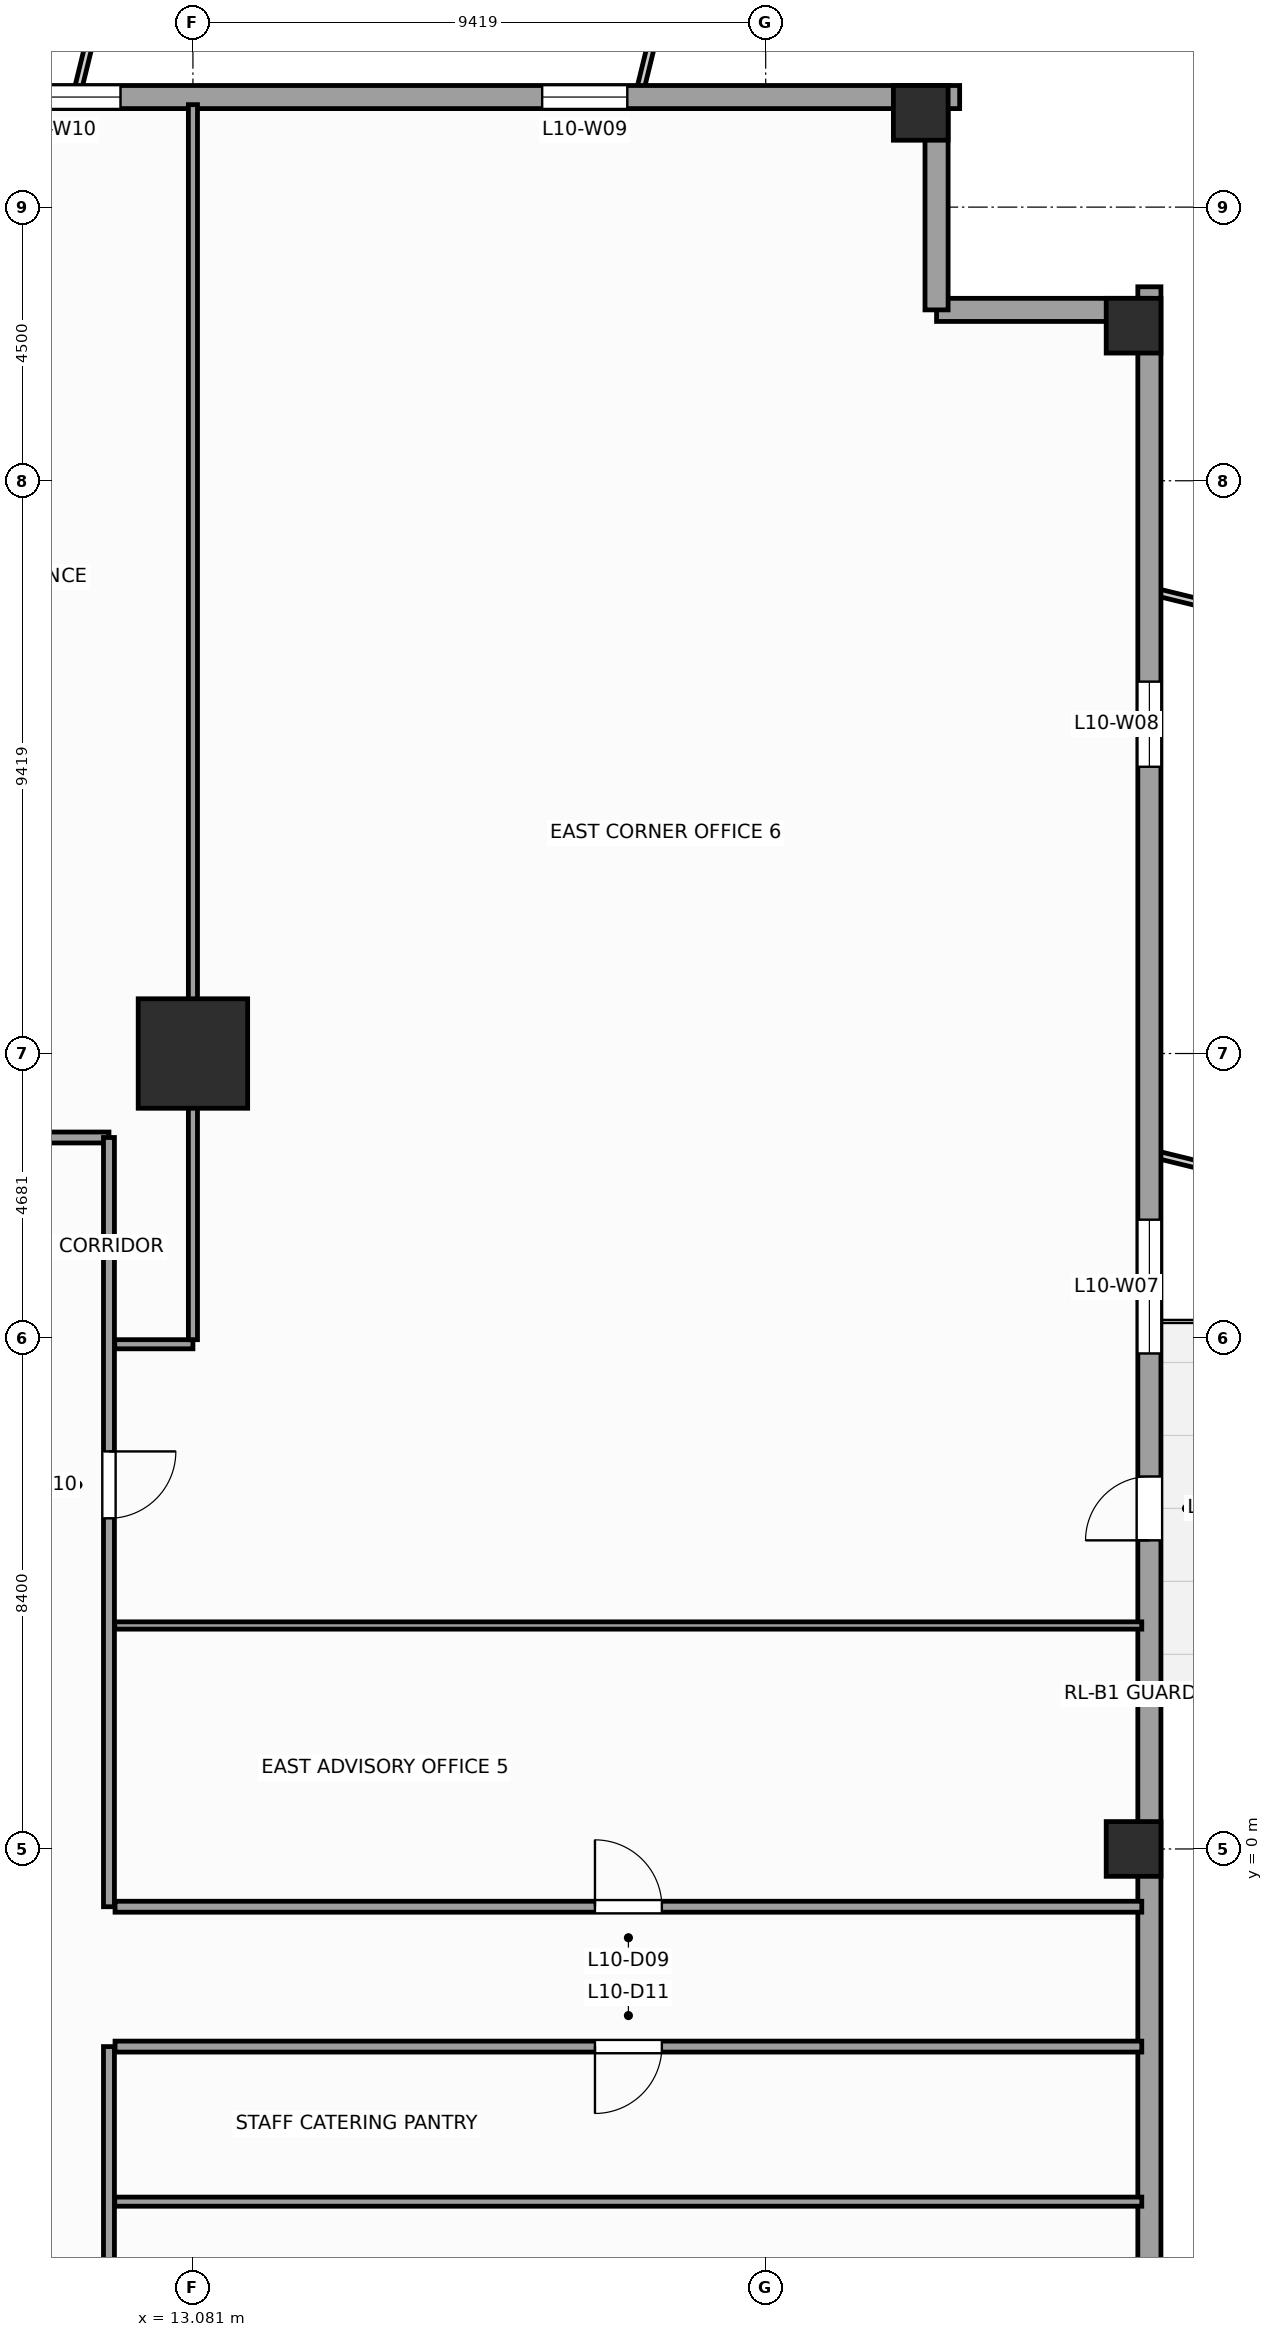
"""IFC4 building model, lengths in metres.
Left out: names, types, materials, properties, quantities, classifications, styles, units other than length and angle.
Written with IfcOpenShell. Run it as: python <this file> out.ifc"""

import sys

from ifc_helpers import new_model, si_unit, direction, frame, frame_2d, origin, origin_2d, place, context, subcontext, project, spatial, rectangle, extrude, source, transform, mapped, element, fill, save


model = new_model("IFC4")
c1 = context("Model", 3, precision=1e-05, world=origin(), true_north=direction((0.0, 1.0)))
c2 = subcontext(c1, "Body", "Model", "MODEL_VIEW")
j1 = project(units=[si_unit("LENGTHUNIT", "METRE"), si_unit("PLANEANGLEUNIT", "RADIAN")], contexts=[c1])
p1 = place(None, origin())
s1 = spatial("IfcSite", under=j1, at=p1, CompositionType="ELEMENT")
p2 = place(p1, origin())
s2 = spatial("IfcBuilding", under=s1, at=p2, CompositionType="ELEMENT")
p3 = place(p2, frame((0.0, 0.0, 46.0)))
s3 = spatial("IfcBuildingStorey", under=s2, at=p3, CompositionType="ELEMENT", Elevation=46.0)
m1 = source(origin(), c2, "Body", "SweptSolid", [
    extrude(rectangle(XDim=1.8, YDim=1.8, at=origin_2d()), origin(), (0.0, 0.0, 1.0), 4.0),
])
p4 = place(p3, frame((13.081, 13.081, 0.0), z_axis=(0.0, 0.0, 1.0), x_axis=(1.0, 0.0, 0.0)))
e1 = element("IfcColumn", 1, at=p4, inside=s3, PredefinedType="COLUMN", context=c2, shape_type="MappedRepresentation", body=[
    mapped(m1, transform((0.0, 0.0, 0.0), scale=1.0)),
])
m2 = source(origin(), c2, "Body", "SweptSolid", [
    extrude(rectangle(XDim=0.9, YDim=0.9, at=origin_2d()), origin(), (0.0, 0.0, 1.0), 4.0),
])
for number, where, z_axis, x_axis in (
    (2, (28.55, 0.0, 0.0), (0.0, 0.0, 1.0), (1.0, 0.0, 0.0)),
    (3, (28.55, 25.05, 0.0), (0.0, 0.0, 1.0), (1.0, 0.0, 0.0)),
    (4, (25.05, 28.55, 0.0), (0.0, 0.0, 1.0), (1.0, 0.0, 0.0)),
):
    element("IfcColumn", number, at=place(p3, frame(where, z_axis=z_axis, x_axis=x_axis)), inside=s3, PredefinedType="COLUMN", context=c2, shape_type="MappedRepresentation", body=[
        mapped(m2, transform((0.0, 0.0, 0.0), scale=1.0)),
    ])
p5 = place(p3, frame((28.81, -25.69, 0.0), z_axis=(0.0, 0.0, 1.0), x_axis=(0.0, 1.0, 0.0)))
e5 = element("IfcWall", 5, at=p5, inside=s3, PredefinedType="STANDARD", context=c2, shape_type="SweptSolid", body=[
    extrude(rectangle(XDim=51.38, YDim=0.38, at=frame_2d((25.69, 0.0))), origin(), (0.0, 0.0, 1.0), 3.12),
])
p6 = place(p5, frame((30.765, 0.0, 0.0)))
e6 = element("IfcOpeningElement", 6, at=p6, cuts=e5, PredefinedType="OPENING", context=c2, shape_type="SweptSolid", body=[
    extrude(rectangle(XDim=1.05, YDim=2.25, at=frame_2d((0.525, 1.125))), frame((0.0, 0.2, 0.0), z_axis=(0.0, -1.0, 0.0), x_axis=(1.0, 0.0, 0.0)), (0.0, 0.0, 1.0), 0.4),
])
p7 = place(p5, frame((5.466, 0.0, 0.49)))
e7 = element("IfcOpeningElement", 7, at=p7, cuts=e5, PredefinedType="OPENING", context=c2, shape_type="SweptSolid", body=[
    extrude(rectangle(XDim=1.4, YDim=2.4, at=frame_2d((0.7, 1.2))), frame((0.0, 0.2, 0.0), z_axis=(0.0, -1.0, 0.0), x_axis=(1.0, 0.0, 0.0)), (0.0, 0.0, 1.0), 0.4),
])
p8 = place(p5, frame((13.8, 0.0, 0.49)))
e8 = element("IfcOpeningElement", 8, at=p8, cuts=e5, PredefinedType="OPENING", context=c2, shape_type="SweptSolid", body=[
    extrude(rectangle(XDim=2.2, YDim=2.4, at=frame_2d((1.1, 1.2))), frame((0.0, 0.2, 0.0), z_axis=(0.0, -1.0, 0.0), x_axis=(1.0, 0.0, 0.0)), (0.0, 0.0, 1.0), 0.4),
])
p9 = place(p5, frame((33.838, 0.0, 0.49)))
e9 = element("IfcOpeningElement", 9, at=p9, cuts=e5, PredefinedType="OPENING", context=c2, shape_type="SweptSolid", body=[
    extrude(rectangle(XDim=2.2, YDim=2.4, at=frame_2d((1.1, 1.2))), frame((0.0, 0.2, 0.0), z_axis=(0.0, -1.0, 0.0), x_axis=(1.0, 0.0, 0.0)), (0.0, 0.0, 1.0), 0.4),
])
p10 = place(p5, frame((43.487, 0.0, 0.49)))
e10 = element("IfcOpeningElement", 10, at=p10, cuts=e5, PredefinedType="OPENING", context=c2, shape_type="SweptSolid", body=[
    extrude(rectangle(XDim=1.4, YDim=2.4, at=frame_2d((0.7, 1.2))), frame((0.0, 0.2, 0.0), z_axis=(0.0, -1.0, 0.0), x_axis=(1.0, 0.0, 0.0)), (0.0, 0.0, 1.0), 0.4),
])
p11 = place(p3, frame((28.81, 25.31, 0.0), z_axis=(0.0, 0.0, 1.0), x_axis=(-1.0, 0.0, 0.0)))
e11 = element("IfcWall", 11, at=p11, inside=s3, PredefinedType="STANDARD", context=c2, shape_type="SweptSolid", body=[
    extrude(rectangle(XDim=3.5, YDim=0.38, at=frame_2d((1.75, 0.0))), origin(), (0.0, 0.0, 1.0), 3.72),
])
p12 = place(p3, frame((25.31, 25.31, 0.0), z_axis=(0.0, 0.0, 1.0), x_axis=(0.0, 1.0, 0.0)))
e12 = element("IfcWall", 12, at=p12, inside=s3, PredefinedType="STANDARD", context=c2, shape_type="SweptSolid", body=[
    extrude(rectangle(XDim=3.69, YDim=0.38, at=frame_2d((1.845, 0.0))), origin(), (0.0, 0.0, 1.0), 3.72),
])
p13 = place(p3, frame((25.69, 28.81, 0.0), z_axis=(0.0, 0.0, 1.0), x_axis=(-1.0, 0.0, 0.0)))
e13 = element("IfcWall", 13, at=p13, inside=s3, PredefinedType="STANDARD", context=c2, shape_type="SweptSolid", body=[
    extrude(rectangle(XDim=51.38, YDim=0.38, at=frame_2d((25.69, 0.0))), origin(), (0.0, 0.0, 1.0), 3.12),
])
p14 = place(p13, frame((5.466, 0.0, 0.49)))
e14 = element("IfcOpeningElement", 14, at=p14, cuts=e13, PredefinedType="OPENING", context=c2, shape_type="SweptSolid", body=[
    extrude(rectangle(XDim=1.4, YDim=2.4, at=frame_2d((0.7, 1.2))), frame((0.0, 0.2, 0.0), z_axis=(0.0, -1.0, 0.0), x_axis=(1.0, 0.0, 0.0)), (0.0, 0.0, 1.0), 0.4),
])
p15 = place(p13, frame((13.8, 0.0, 0.49)))
e15 = element("IfcOpeningElement", 15, at=p15, cuts=e13, PredefinedType="OPENING", context=c2, shape_type="SweptSolid", body=[
    extrude(rectangle(XDim=2.2, YDim=2.4, at=frame_2d((1.1, 1.2))), frame((0.0, 0.2, 0.0), z_axis=(0.0, -1.0, 0.0), x_axis=(1.0, 0.0, 0.0)), (0.0, 0.0, 1.0), 0.4),
])
p16 = place(p13, frame((22.062, 0.0, 0.49)))
e16 = element("IfcOpeningElement", 16, at=p16, cuts=e13, PredefinedType="OPENING", context=c2, shape_type="SweptSolid", body=[
    extrude(rectangle(XDim=2.2, YDim=2.4, at=frame_2d((1.1, 1.2))), frame((0.0, 0.2, 0.0), z_axis=(0.0, -1.0, 0.0), x_axis=(1.0, 0.0, 0.0)), (0.0, 0.0, 1.0), 0.4),
])
p17 = place(p13, frame((33.838, 0.0, 0.49)))
e17 = element("IfcOpeningElement", 17, at=p17, cuts=e13, PredefinedType="OPENING", context=c2, shape_type="SweptSolid", body=[
    extrude(rectangle(XDim=2.2, YDim=2.4, at=frame_2d((1.1, 1.2))), frame((0.0, 0.2, 0.0), z_axis=(0.0, -1.0, 0.0), x_axis=(1.0, 0.0, 0.0)), (0.0, 0.0, 1.0), 0.4),
])
p18 = place(p13, frame((43.487, 0.0, 0.49)))
e18 = element("IfcOpeningElement", 18, at=p18, cuts=e13, PredefinedType="OPENING", context=c2, shape_type="SweptSolid", body=[
    extrude(rectangle(XDim=1.4, YDim=2.4, at=frame_2d((0.7, 1.2))), frame((0.0, 0.2, 0.0), z_axis=(0.0, -1.0, 0.0), x_axis=(1.0, 0.0, 0.0)), (0.0, 0.0, 1.0), 0.4),
])
p19 = place(p3, frame((-10.6, 11.7, 0.0), z_axis=(0.0, 0.0, 1.0), x_axis=(1.0, 0.0, 0.0)))
e19 = element("IfcWall", 19, at=p19, inside=s3, PredefinedType="PARTITIONING", context=c2, shape_type="SweptSolid", body=[
    extrude(rectangle(XDim=22.3, YDim=0.18, at=frame_2d((11.15, 0.0))), origin(), (0.0, 0.0, 1.0), 3.72),
])
p20 = place(p19, frame((2.014, 0.0, 0.0)))
e20 = element("IfcOpeningElement", 20, at=p20, cuts=e19, PredefinedType="OPENING", context=c2, shape_type="SweptSolid", body=[
    extrude(rectangle(XDim=1.1, YDim=2.2, at=frame_2d((0.55, 1.1))), frame((0.0, 0.1, 0.0), z_axis=(0.0, -1.0, 0.0), x_axis=(1.0, 0.0, 0.0)), (0.0, 0.0, 1.0), 0.2),
])
p21 = place(p19, frame((7.4, 0.0, 0.0)))
e21 = element("IfcOpeningElement", 21, at=p21, cuts=e19, PredefinedType="OPENING", context=c2, shape_type="SweptSolid", body=[
    extrude(rectangle(XDim=1.1, YDim=2.2, at=frame_2d((0.55, 1.1))), frame((0.0, 0.1, 0.0), z_axis=(0.0, -1.0, 0.0), x_axis=(1.0, 0.0, 0.0)), (0.0, 0.0, 1.0), 0.2),
])
p22 = place(p19, frame((13.4, 0.0, 0.0)))
e22 = element("IfcOpeningElement", 22, at=p22, cuts=e19, PredefinedType="OPENING", context=c2, shape_type="SweptSolid", body=[
    extrude(rectangle(XDim=1.1, YDim=2.2, at=frame_2d((0.55, 1.1))), frame((0.0, 0.1, 0.0), z_axis=(0.0, -1.0, 0.0), x_axis=(1.0, 0.0, 0.0)), (0.0, 0.0, 1.0), 0.2),
])
p23 = place(p19, frame((18.835, 0.0, 0.0)))
e23 = element("IfcOpeningElement", 23, at=p23, cuts=e19, PredefinedType="OPENING", context=c2, shape_type="SweptSolid", body=[
    extrude(rectangle(XDim=1.1, YDim=2.2, at=frame_2d((0.55, 1.1))), frame((0.0, 0.1, 0.0), z_axis=(0.0, -1.0, 0.0), x_axis=(1.0, 0.0, 0.0)), (0.0, 0.0, 1.0), 0.2),
])
p24 = place(p3, frame((11.7, -10.6, 0.0), z_axis=(0.0, 0.0, 1.0), x_axis=(0.0, 1.0, 0.0)))
e24 = element("IfcWall", 24, at=p24, inside=s3, PredefinedType="PARTITIONING", context=c2, shape_type="SweptSolid", body=[
    extrude(rectangle(XDim=7.35, YDim=0.18, at=frame_2d((3.675, 0.0))), origin(), (0.0, 0.0, 1.0), 3.72),
])
p25 = place(p3, frame((11.7, -0.95, 0.0), z_axis=(0.0, 0.0, 1.0), x_axis=(0.0, 1.0, 0.0)))
e25 = element("IfcWall", 25, at=p25, inside=s3, PredefinedType="PARTITIONING", context=c2, shape_type="SweptSolid", body=[
    extrude(rectangle(XDim=12.65, YDim=0.18, at=frame_2d((6.325, 0.0))), origin(), (0.0, 0.0, 1.0), 3.72),
])
p26 = place(p25, frame((6.387, 0.0, 0.0)))
e26 = element("IfcOpeningElement", 26, at=p26, cuts=e25, PredefinedType="OPENING", context=c2, shape_type="SweptSolid", body=[
    extrude(rectangle(XDim=1.1, YDim=2.2, at=frame_2d((0.55, 1.1))), frame((0.0, 0.1, 0.0), z_axis=(0.0, -1.0, 0.0), x_axis=(1.0, 0.0, 0.0)), (0.0, 0.0, 1.0), 0.2),
])
p27 = place(p3, frame((11.8, -3.25, 0.0), z_axis=(0.0, 0.0, 1.0), x_axis=(1.0, 0.0, 0.0)))
e27 = element("IfcWall", 27, at=p27, inside=s3, PredefinedType="PARTITIONING", context=c2, shape_type="SweptSolid", body=[
    extrude(rectangle(XDim=16.885, YDim=0.18, at=frame_2d((8.442, 0.0))), origin(), (0.0, 0.0, 1.0), 3.72),
])
p28 = place(p27, frame((7.893, 0.0, 0.0)))
e28 = element("IfcOpeningElement", 28, at=p28, cuts=e27, PredefinedType="OPENING", context=c2, shape_type="SweptSolid", body=[
    extrude(rectangle(XDim=1.1, YDim=2.2, at=frame_2d((0.55, 1.1))), frame((0.0, 0.1, 0.0), z_axis=(0.0, -1.0, 0.0), x_axis=(1.0, 0.0, 0.0)), (0.0, 0.0, 1.0), 0.2),
])
p29 = place(p3, frame((11.8, -0.95, 0.0), z_axis=(0.0, 0.0, 1.0), x_axis=(1.0, 0.0, 0.0)))
e29 = element("IfcWall", 29, at=p29, inside=s3, PredefinedType="PARTITIONING", context=c2, shape_type="SweptSolid", body=[
    extrude(rectangle(XDim=16.885, YDim=0.18, at=frame_2d((8.442, 0.0))), origin(), (0.0, 0.0, 1.0), 3.72),
])
p30 = place(p29, frame((7.893, 0.0, 0.0)))
e30 = element("IfcOpeningElement", 30, at=p30, cuts=e29, PredefinedType="OPENING", context=c2, shape_type="SweptSolid", body=[
    extrude(rectangle(XDim=1.1, YDim=2.2, at=frame_2d((0.55, 1.1))), frame((0.0, 0.1, 0.0), z_axis=(0.0, -1.0, 0.0), x_axis=(1.0, 0.0, 0.0)), (0.0, 0.0, 1.0), 0.2),
])
p31 = place(p3, frame((11.795, 8.3, 0.0), z_axis=(0.0, 0.0, 1.0), x_axis=(1.0, 0.0, 0.0)))
e31 = element("IfcWall", 31, at=p31, inside=s3, PredefinedType="PARTITIONING", context=c2, shape_type="SweptSolid", body=[
    extrude(rectangle(XDim=1.286, YDim=0.15, at=frame_2d((0.643, 0.0))), origin(), (0.0, 0.0, 1.0), 3.72),
])
p32 = place(p3, frame((13.081, 8.375, 0.0), z_axis=(0.0, 0.0, 1.0), x_axis=(0.0, 1.0, 0.0)))
e32 = element("IfcWall", 32, at=p32, inside=s3, PredefinedType="PARTITIONING", context=c2, shape_type="SweptSolid", body=[
    extrude(rectangle(XDim=20.31, YDim=0.15, at=frame_2d((10.155, 0.0))), origin(), (0.0, 0.0, 1.0), 2.712),
])
p33 = place(p3, frame((11.795, 3.675, 0.0), z_axis=(0.0, 0.0, 1.0), x_axis=(1.0, 0.0, 0.0)))
e33 = element("IfcWall", 33, at=p33, inside=s3, PredefinedType="PARTITIONING", context=c2, shape_type="SweptSolid", body=[
    extrude(rectangle(XDim=16.89, YDim=0.12, at=frame_2d((8.445, 0.0))), origin(), (0.0, 0.0, 1.0), 3.72),
])
p34 = place(p3, frame((11.795, -5.8, 0.0), z_axis=(0.0, 0.0, 1.0), x_axis=(1.0, 0.0, 0.0)))
e34 = element("IfcWall", 34, at=p34, inside=s3, PredefinedType="PARTITIONING", context=c2, shape_type="SweptSolid", body=[
    extrude(rectangle(XDim=16.89, YDim=0.15, at=frame_2d((8.445, 0.0))), origin(), (0.0, 0.0, 1.0), 3.72),
])
m3 = source(origin(), c2, "Body", "SweptSolid", [
    extrude(rectangle(XDim=1.05, YDim=2.25, at=frame_2d((0.525, 1.125))), frame((0.0, 0.025, 0.0), z_axis=(0.0, -1.0, 0.0), x_axis=(1.0, 0.0, 0.0)), (0.0, 0.0, 1.0), 0.05),
])
p35 = place(p6, origin())
e35 = element("IfcDoor", 35, at=p35, inside=s3, OperationType="SINGLE_SWING_LEFT", PredefinedType="DOOR", context=c2, shape_type="MappedRepresentation", body=[
    mapped(m3, transform((0.0, 0.0, 0.0), scale=1.0)),
])
fill(e6, e35)
m4 = source(origin(), c2, "Body", "SweptSolid", [
    extrude(rectangle(XDim=2.2, YDim=2.4, at=frame_2d((1.1, 1.2))), frame((0.0, 0.03, 0.0), z_axis=(0.0, -1.0, 0.0), x_axis=(1.0, 0.0, 0.0)), (0.0, 0.0, 1.0), 0.06),
])
p36 = place(p9, origin())
e36 = element("IfcWindow", 36, at=p36, inside=s3, PartitioningType="SINGLE_PANEL", PredefinedType="WINDOW", context=c2, shape_type="MappedRepresentation", body=[
    mapped(m4, transform((0.0, 0.0, 0.0), scale=1.0)),
])
fill(e9, e36)
m5 = source(origin(), c2, "Body", "SweptSolid", [
    extrude(rectangle(XDim=1.4, YDim=2.4, at=frame_2d((0.7, 1.2))), frame((0.0, 0.03, 0.0), z_axis=(0.0, -1.0, 0.0), x_axis=(1.0, 0.0, 0.0)), (0.0, 0.0, 1.0), 0.06),
])
p37 = place(p10, origin())
e37 = element("IfcWindow", 37, at=p37, inside=s3, PartitioningType="SINGLE_PANEL", PredefinedType="WINDOW", context=c2, shape_type="MappedRepresentation", body=[
    mapped(m5, transform((0.0, 0.0, 0.0), scale=1.0)),
])
fill(e10, e37)
p38 = place(p14, origin())
e38 = element("IfcWindow", 38, at=p38, inside=s3, PartitioningType="SINGLE_PANEL", PredefinedType="WINDOW", context=c2, shape_type="MappedRepresentation", body=[
    mapped(m5, transform((0.0, 0.0, 0.0), scale=1.0)),
])
fill(e14, e38)
p39 = place(p15, origin())
e39 = element("IfcWindow", 39, at=p39, inside=s3, PartitioningType="SINGLE_PANEL", PredefinedType="WINDOW", context=c2, shape_type="MappedRepresentation", body=[
    mapped(m4, transform((0.0, 0.0, 0.0), scale=1.0)),
])
fill(e15, e39)
m6 = source(origin(), c2, "Body", "SweptSolid", [
    extrude(rectangle(XDim=1.1, YDim=2.2, at=frame_2d((0.55, 1.1))), frame((0.0, 0.025, 0.0), z_axis=(0.0, -1.0, 0.0), x_axis=(1.0, 0.0, 0.0)), (0.0, 0.0, 1.0), 0.05),
])
p40 = place(p30, origin())
e40 = element("IfcDoor", 40, at=p40, inside=s3, OperationType="SINGLE_SWING_LEFT", PredefinedType="DOOR", context=c2, shape_type="MappedRepresentation", body=[
    mapped(m6, transform((0.0, 0.0, 0.0), scale=1.0)),
])
fill(e30, e40)
p41 = place(p26, frame((1.1, 0.0, 0.0), z_axis=(0.0, 0.0, 1.0), x_axis=(-1.0, 0.0, 0.0)))
e41 = element("IfcDoor", 41, at=p41, inside=s3, OperationType="SINGLE_SWING_RIGHT", PredefinedType="DOOR", context=c2, shape_type="MappedRepresentation", body=[
    mapped(m6, transform((0.0, 0.0, 0.0), scale=1.0)),
])
fill(e26, e41)
p42 = place(p28, frame((1.1, 0.0, 0.0), z_axis=(0.0, 0.0, 1.0), x_axis=(-1.0, 0.0, 0.0)))
e42 = element("IfcDoor", 42, at=p42, inside=s3, OperationType="SINGLE_SWING_LEFT", PredefinedType="DOOR", context=c2, shape_type="MappedRepresentation", body=[
    mapped(m6, transform((0.0, 0.0, 0.0), scale=1.0)),
])
fill(e28, e42)
save(model, sys.argv[1])
